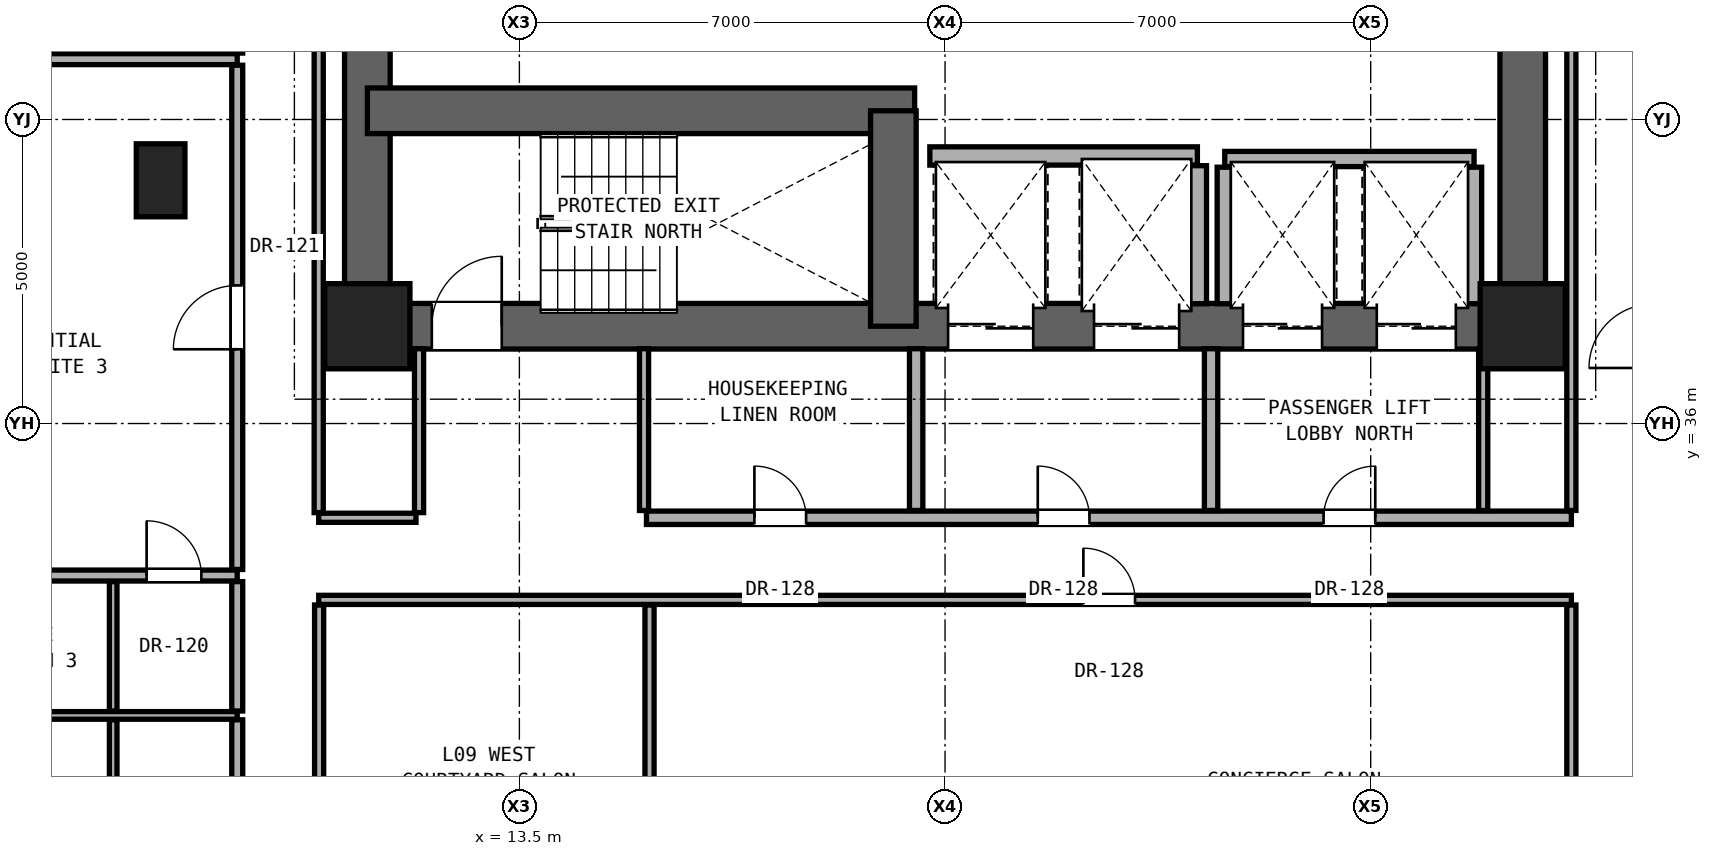
"""IFC4 building model, lengths in metres.
Left out: names, types, materials, properties, quantities, classifications, styles, units other than length and angle.
Written with IfcOpenShell. Run it as: python <this file> out.ifc"""

import sys

from ifc_helpers import new_model, si_unit, direction, frame, frame_2d, origin, origin_2d, place, context, subcontext, project, spatial, rectangle, extrude, element, fill, save


model = new_model("IFC4")
c1 = context("Model", 3, precision=1e-05, world=origin(), true_north=direction((0.0, 1.0)))
c2 = subcontext(c1, "Body", "Model", "MODEL_VIEW")
j1 = project(units=[si_unit("LENGTHUNIT", "METRE"), si_unit("PLANEANGLEUNIT", "RADIAN")], contexts=[c1])
p1 = place(None, origin())
s1 = spatial("IfcSite", under=j1, at=p1, CompositionType="ELEMENT")
p2 = place(p1, origin())
s2 = spatial("IfcBuilding", under=s1, at=p2, CompositionType="ELEMENT")
p3 = place(p2, frame((0.0, 0.0, 35.6)))
s3 = spatial("IfcBuildingStorey", under=s2, at=p3, CompositionType="ELEMENT", Elevation=35.6)
for number, where, z_axis, x_axis in (
    (1, (11.0, 37.6, 0.0), (0.0, 0.0, 1.0), (1.0, 0.0, 0.0)),
    (2, (30.0, 37.6, 0.0), (0.0, 0.0, 1.0), (1.0, 0.0, 0.0)),
):
    element("IfcColumn", number, at=place(p3, frame(where, z_axis=z_axis, x_axis=x_axis)), inside=s3, PredefinedType="COLUMN", context=c2, shape_type="SweptSolid", body=[
        extrude(rectangle(XDim=1.4, YDim=1.4, at=origin_2d()), origin(), (0.0, 0.0, 1.0), 3.3),
    ])
p4 = place(p3, frame((7.6, 40.0, 0.0), z_axis=(0.0, 0.0, 1.0), x_axis=(1.0, 0.0, 0.0)))
e3 = element("IfcColumn", 3, at=p4, inside=s3, PredefinedType="PILASTER", context=c2, shape_type="SweptSolid", body=[
    extrude(rectangle(XDim=0.8, YDim=1.2, at=origin_2d()), origin(), (0.0, 0.0, 1.0), 3.3),
])
for number, where, z_axis, x_axis in (
    (4, (11.0, 37.6, 0.0), (0.0, 0.0, 1.0), (0.0, 1.0, 0.0)),
    (5, (30.0, 37.6, 0.0), (0.0, 0.0, 1.0), (0.0, 1.0, 0.0)),
):
    element("IfcWall", number, at=place(p3, frame(where, z_axis=z_axis, x_axis=x_axis)), inside=s3, PredefinedType="SHEAR", context=c2, shape_type="SweptSolid", body=[
        extrude(rectangle(XDim=6.0, YDim=0.75, at=frame_2d((3.0, 0.0))), origin(), (0.0, 0.0, 1.0), 3.06),
    ])
p5 = place(p3, frame((11.0, 37.6, 0.0), z_axis=(0.0, 0.0, 1.0), x_axis=(1.0, 0.0, 0.0)))
e6 = element("IfcWall", 6, at=p5, inside=s3, PredefinedType="SHEAR", context=c2, shape_type="SweptSolid", body=[
    extrude(rectangle(XDim=19.0, YDim=0.75, at=frame_2d((9.5, 0.0))), origin(), (0.0, 0.0, 1.0), 3.06),
])
p6 = place(p5, frame((1.06, 0.0, 0.0)))
e7 = element("IfcOpeningElement", 7, at=p6, cuts=e6, PredefinedType="OPENING", context=c2, shape_type="SweptSolid", body=[
    extrude(rectangle(XDim=1.15, YDim=2.2, at=frame_2d((0.575, 1.1))), frame((0.0, 0.385, 0.0), z_axis=(0.0, -1.0, 0.0), x_axis=(1.0, 0.0, 0.0)), (0.0, 0.0, 1.0), 0.77),
])
p7 = place(p5, frame((9.55, 0.0, 0.0)))
e8 = element("IfcOpeningElement", 8, at=p7, cuts=e6, PredefinedType="OPENING", context=c2, shape_type="SweptSolid", body=[
    extrude(rectangle(XDim=1.4, YDim=2.35, at=frame_2d((0.7, 1.175))), frame((0.0, 0.385, 0.0), z_axis=(0.0, -1.0, 0.0), x_axis=(1.0, 0.0, 0.0)), (0.0, 0.0, 1.0), 0.77),
])
p8 = place(p5, frame((11.95, 0.0, 0.0)))
e9 = element("IfcOpeningElement", 9, at=p8, cuts=e6, PredefinedType="OPENING", context=c2, shape_type="SweptSolid", body=[
    extrude(rectangle(XDim=1.4, YDim=2.35, at=frame_2d((0.7, 1.175))), frame((0.0, 0.385, 0.0), z_axis=(0.0, -1.0, 0.0), x_axis=(1.0, 0.0, 0.0)), (0.0, 0.0, 1.0), 0.77),
])
p9 = place(p5, frame((14.4, 0.0, 0.0)))
e10 = element("IfcOpeningElement", 10, at=p9, cuts=e6, PredefinedType="OPENING", context=c2, shape_type="SweptSolid", body=[
    extrude(rectangle(XDim=1.3, YDim=2.3, at=frame_2d((0.65, 1.15))), frame((0.0, 0.385, 0.0), z_axis=(0.0, -1.0, 0.0), x_axis=(1.0, 0.0, 0.0)), (0.0, 0.0, 1.0), 0.77),
])
p10 = place(p5, frame((16.6, 0.0, 0.0)))
e11 = element("IfcOpeningElement", 11, at=p10, cuts=e6, PredefinedType="OPENING", context=c2, shape_type="SweptSolid", body=[
    extrude(rectangle(XDim=1.3, YDim=2.3, at=frame_2d((0.65, 1.15))), frame((0.0, 0.385, 0.0), z_axis=(0.0, -1.0, 0.0), x_axis=(1.0, 0.0, 0.0)), (0.0, 0.0, 1.0), 0.77),
])
p11 = place(p3, frame((11.0, 41.143, 0.0), z_axis=(0.0, 0.0, 1.0), x_axis=(1.0, 0.0, 0.0)))
e12 = element("IfcWall", 12, at=p11, inside=s3, PredefinedType="SHEAR", context=c2, shape_type="SweptSolid", body=[
    extrude(rectangle(XDim=9.0, YDim=0.75, at=frame_2d((4.5, 0.0))), origin(), (0.0, 0.0, 1.0), 3.06),
])
p12 = place(p3, frame((19.65, 37.6, 0.0), z_axis=(0.0, 0.0, 1.0), x_axis=(0.0, 1.0, 0.0)))
e13 = element("IfcWall", 13, at=p12, inside=s3, PredefinedType="SHEAR", context=c2, shape_type="SweptSolid", body=[
    extrude(rectangle(XDim=3.543, YDim=0.75, at=frame_2d((1.771, 0.0))), origin(), (0.0, 0.0, 1.0), 3.06),
])
p13 = place(p3, frame((-1.6, 31.2, 0.0), z_axis=(0.0, 0.0, 1.0), x_axis=(1.0, 0.0, 0.0)))
e14 = element("IfcWall", 14, at=p13, inside=s3, PredefinedType="PARTITIONING", context=c2, shape_type="SweptSolid", body=[
    extrude(rectangle(XDim=10.46, YDim=0.125, at=frame_2d((5.23, 0.0))), origin(), (0.0, 0.0, 1.0), 2.125),
])
p14 = place(p3, frame((10.2, 33.1, 0.0), z_axis=(0.0, 0.0, 1.0), x_axis=(1.0, 0.0, 0.0)))
e15 = element("IfcWall", 15, at=p14, inside=s3, PredefinedType="PARTITIONING", context=c2, shape_type="SweptSolid", body=[
    extrude(rectangle(XDim=20.6, YDim=0.15, at=frame_2d((10.3, 0.0))), origin(), (0.0, 0.0, 1.0), 2.104),
])
p15 = place(p14, frame((12.575, 0.0, 0.0)))
e16 = element("IfcOpeningElement", 16, at=p15, cuts=e15, PredefinedType="OPENING", context=c2, shape_type="SweptSolid", body=[
    extrude(rectangle(XDim=0.85, YDim=2.01, at=frame_2d((0.425, 1.005))), frame((0.0, 0.085, 0.0), z_axis=(0.0, -1.0, 0.0), x_axis=(1.0, 0.0, 0.0)), (0.0, 0.0, 1.0), 0.17),
])
p16 = place(p3, frame((-1.6, 33.5, 0.0), z_axis=(0.0, 0.0, 1.0), x_axis=(1.0, 0.0, 0.0)))
e17 = element("IfcWall", 17, at=p16, inside=s3, PredefinedType="PARTITIONING", context=c2, shape_type="SweptSolid", body=[
    extrude(rectangle(XDim=10.46, YDim=0.18, at=frame_2d((5.23, 0.0))), origin(), (0.0, 0.0, 1.0), 2.125),
])
p17 = place(p16, frame((3.805, 0.0, 0.0)))
e18 = element("IfcOpeningElement", 18, at=p17, cuts=e17, PredefinedType="OPENING", context=c2, shape_type="SweptSolid", body=[
    extrude(rectangle(XDim=0.85, YDim=2.01, at=frame_2d((0.425, 1.005))), frame((0.0, 0.1, 0.0), z_axis=(0.0, -1.0, 0.0), x_axis=(1.0, 0.0, 0.0)), (0.0, 0.0, 1.0), 0.2),
])
p18 = place(p16, frame((8.97, 0.0, 0.0)))
e19 = element("IfcOpeningElement", 19, at=p18, cuts=e17, PredefinedType="OPENING", context=c2, shape_type="SweptSolid", body=[
    extrude(rectangle(XDim=0.9, YDim=2.1, at=frame_2d((0.45, 1.05))), frame((0.0, 0.1, 0.0), z_axis=(0.0, -1.0, 0.0), x_axis=(1.0, 0.0, 0.0)), (0.0, 0.0, 1.0), 0.2),
])
p19 = place(p3, frame((10.2, 34.45, 0.0), z_axis=(0.0, 0.0, 1.0), x_axis=(1.0, 0.0, 0.0)))
e20 = element("IfcWall", 20, at=p19, inside=s3, PredefinedType="PARTITIONING", context=c2, shape_type="SweptSolid", body=[
    extrude(rectangle(XDim=1.6, YDim=0.15, at=frame_2d((0.8, 0.0))), origin(), (0.0, 0.0, 1.0), 2.104),
])
p20 = place(p3, frame((15.59, 34.45, 0.0), z_axis=(0.0, 0.0, 1.0), x_axis=(1.0, 0.0, 0.0)))
e21 = element("IfcWall", 21, at=p20, inside=s3, PredefinedType="SOLIDWALL", context=c2, shape_type="SweptSolid", body=[
    extrude(rectangle(XDim=15.21, YDim=0.22, at=frame_2d((7.605, 0.0))), origin(), (0.0, 0.0, 1.0), 2.104),
])
p21 = place(p20, frame((6.435, 0.0, 0.0)))
e22 = element("IfcOpeningElement", 22, at=p21, cuts=e21, PredefinedType="OPENING", context=c2, shape_type="SweptSolid", body=[
    extrude(rectangle(XDim=0.85, YDim=2.01, at=frame_2d((0.425, 1.005))), frame((0.0, 0.12, 0.0), z_axis=(0.0, -1.0, 0.0), x_axis=(1.0, 0.0, 0.0)), (0.0, 0.0, 1.0), 0.24),
])
p22 = place(p20, frame((11.135, 0.0, 0.0)))
e23 = element("IfcOpeningElement", 23, at=p22, cuts=e21, PredefinedType="OPENING", context=c2, shape_type="SweptSolid", body=[
    extrude(rectangle(XDim=0.85, YDim=2.01, at=frame_2d((0.425, 1.005))), frame((0.0, 0.12, 0.0), z_axis=(0.0, -1.0, 0.0), x_axis=(1.0, 0.0, 0.0)), (0.0, 0.0, 1.0), 0.24),
])
p23 = place(p20, frame((1.775, 0.0, 0.0)))
e24 = element("IfcOpeningElement", 24, at=p23, cuts=e21, PredefinedType="OPENING", context=c2, shape_type="SweptSolid", body=[
    extrude(rectangle(XDim=0.85, YDim=2.01, at=frame_2d((0.425, 1.005))), frame((0.0, 0.12, 0.0), z_axis=(0.0, -1.0, 0.0), x_axis=(1.0, 0.0, 0.0)), (0.0, 0.0, 1.0), 0.24),
])
p24 = place(p3, frame((25.1, 40.35, 0.0), z_axis=(0.0, 0.0, 1.0), x_axis=(1.0, 0.0, 0.0)))
e25 = element("IfcWall", 25, at=p24, inside=s3, PredefinedType="SOLIDWALL", context=c2, shape_type="SweptSolid", body=[
    extrude(rectangle(XDim=4.1, YDim=0.25, at=frame_2d((2.05, 0.0))), origin(), (0.0, 0.0, 1.0), 3.06),
])
p25 = place(p3, frame((20.25, 40.4, 0.0), z_axis=(0.0, 0.0, 1.0), x_axis=(1.0, 0.0, 0.0)))
e26 = element("IfcWall", 26, at=p25, inside=s3, PredefinedType="SOLIDWALL", context=c2, shape_type="SweptSolid", body=[
    extrude(rectangle(XDim=4.4, YDim=0.3, at=frame_2d((2.2, 0.0))), origin(), (0.0, 0.0, 1.0), 3.06),
])
p26 = place(p3, frame((3.8, 41.992, 0.0), z_axis=(0.0, 0.0, 1.0), x_axis=(1.0, 0.0, 0.0)))
e27 = element("IfcWall", 27, at=p26, inside=s3, PredefinedType="PARTITIONING", context=c2, shape_type="SweptSolid", body=[
    extrude(rectangle(XDim=5.06, YDim=0.18, at=frame_2d((2.53, 0.0))), origin(), (0.0, 0.0, 1.0), 3.06),
])
for number, where, z_axis, x_axis in (
    (28, (6.82, 29.0, 0.0), (0.0, 0.0, 1.0), (0.0, 1.0, 0.0)),
    (29, (6.82, 31.272, 0.0), (0.0, 0.0, 1.0), (0.0, 1.0, 0.0)),
):
    element("IfcWall", number, at=place(p3, frame(where, z_axis=z_axis, x_axis=x_axis)), inside=s3, PredefinedType="PARTITIONING", context=c2, shape_type="SweptSolid", body=[
        extrude(rectangle(XDim=2.127, YDim=0.125, at=frame_2d((1.064, 0.0))), origin(), (0.0, 0.0, 1.0), 2.279),
    ])
for number, where, z_axis, x_axis in (
    (30, (8.86, 29.0, 0.0), (0.0, 0.0, 1.0), (0.0, 1.0, 0.0)),
    (31, (8.86, 31.272, 0.0), (0.0, 0.0, 1.0), (0.0, 1.0, 0.0)),
):
    element("IfcWall", number, at=place(p3, frame(where, z_axis=z_axis, x_axis=x_axis)), inside=s3, PredefinedType="PARTITIONING", context=c2, shape_type="SweptSolid", body=[
        extrude(rectangle(XDim=2.127, YDim=0.18, at=frame_2d((1.064, 0.0))), origin(), (0.0, 0.0, 1.0), 2.279),
    ])
p27 = place(p3, frame((8.86, 33.6, 0.0), z_axis=(0.0, 0.0, 1.0), x_axis=(0.0, 1.0, 0.0)))
e32 = element("IfcWall", 32, at=p27, inside=s3, PredefinedType="PARTITIONING", context=c2, shape_type="SweptSolid", body=[
    extrude(rectangle(XDim=8.292, YDim=0.18, at=frame_2d((4.146, 0.0))), origin(), (0.0, 0.0, 1.0), 2.436),
])
p28 = place(p27, frame((3.621, 0.0, 0.0)))
e33 = element("IfcOpeningElement", 33, at=p28, cuts=e32, PredefinedType="OPENING", context=c2, shape_type="SweptSolid", body=[
    extrude(rectangle(XDim=1.05, YDim=2.2, at=frame_2d((0.525, 1.1))), frame((0.0, 0.1, 0.0), z_axis=(0.0, -1.0, 0.0), x_axis=(1.0, 0.0, 0.0)), (0.0, 0.0, 1.0), 0.2),
])
p29 = place(p3, frame((8.86, 42.092, 0.0), z_axis=(0.0, 0.0, 1.0), x_axis=(0.0, 1.0, 0.0)))
e34 = element("IfcWall", 34, at=p29, inside=s3, PredefinedType="PARTITIONING", context=c2, shape_type="SweptSolid", body=[
    extrude(rectangle(XDim=5.28, YDim=0.18, at=frame_2d((2.64, 0.0))), origin(), (0.0, 0.0, 1.0), 3.06),
])
p30 = place(p29, frame((2.165, 0.0, 0.0)))
e35 = element("IfcOpeningElement", 35, at=p30, cuts=e34, PredefinedType="OPENING", context=c2, shape_type="SweptSolid", body=[
    extrude(rectangle(XDim=0.95, YDim=2.15, at=frame_2d((0.475, 1.075))), frame((0.0, 0.1, 0.0), z_axis=(0.0, -1.0, 0.0), x_axis=(1.0, 0.0, 0.0)), (0.0, 0.0, 1.0), 0.2),
])
p31 = place(p3, frame((10.207, 22.935, 0.0), z_axis=(0.0, 0.0, 1.0), x_axis=(0.0, 1.0, 0.0)))
e36 = element("IfcWall", 36, at=p31, inside=s3, PredefinedType="PARTITIONING", context=c2, shape_type="SweptSolid", body=[
    extrude(rectangle(XDim=10.08, YDim=0.15, at=frame_2d((5.04, 0.0))), origin(), (0.0, 0.0, 1.0), 2.279),
])
p32 = place(p31, frame((4.565, 0.0, 0.0)))
e37 = element("IfcOpeningElement", 37, at=p32, cuts=e36, PredefinedType="OPENING", context=c2, shape_type="SweptSolid", body=[
    extrude(rectangle(XDim=0.95, YDim=2.15, at=frame_2d((0.475, 1.075))), frame((0.0, 0.085, 0.0), z_axis=(0.0, -1.0, 0.0), x_axis=(1.0, 0.0, 0.0)), (0.0, 0.0, 1.0), 0.17),
])
p33 = place(p3, frame((10.2, 34.535, 0.0), z_axis=(0.0, 0.0, 1.0), x_axis=(0.0, 1.0, 0.0)))
e38 = element("IfcWall", 38, at=p33, inside=s3, PredefinedType="PARTITIONING", context=c2, shape_type="SweptSolid", body=[
    extrude(rectangle(XDim=9.13, YDim=0.15, at=frame_2d((4.565, 0.0))), origin(), (0.0, 0.0, 1.0), 2.436),
])
p34 = place(p3, frame((11.85, 34.535, 0.0), z_axis=(0.0, 0.0, 1.0), x_axis=(0.0, 1.0, 0.0)))
e39 = element("IfcWall", 39, at=p34, inside=s3, PredefinedType="PARTITIONING", context=c2, shape_type="SweptSolid", body=[
    extrude(rectangle(XDim=2.695, YDim=0.15, at=frame_2d((1.348, 0.0))), origin(), (0.0, 0.0, 1.0), 3.06),
])
p35 = place(p3, frame((15.64, 27.113, 0.0), z_axis=(0.0, 0.0, 1.0), x_axis=(0.0, 1.0, 0.0)))
e40 = element("IfcWall", 40, at=p35, inside=s3, PredefinedType="PARTITIONING", context=c2, shape_type="SweptSolid", body=[
    extrude(rectangle(XDim=5.902, YDim=0.15, at=frame_2d((2.951, 0.0))), origin(), (0.0, 0.0, 1.0), 2.104),
])
p36 = place(p3, frame((15.55, 34.57, 0.0), z_axis=(0.0, 0.0, 1.0), x_axis=(0.0, 1.0, 0.0)))
e41 = element("IfcWall", 41, at=p36, inside=s3, PredefinedType="PARTITIONING", context=c2, shape_type="SweptSolid", body=[
    extrude(rectangle(XDim=2.66, YDim=0.15, at=frame_2d((1.33, 0.0))), origin(), (0.0, 0.0, 1.0), 2.589),
])
p37 = place(p3, frame((20.025, 34.57, 0.0), z_axis=(0.0, 0.0, 1.0), x_axis=(0.0, 1.0, 0.0)))
e42 = element("IfcWall", 42, at=p37, inside=s3, PredefinedType="SOLIDWALL", context=c2, shape_type="SweptSolid", body=[
    extrude(rectangle(XDim=2.66, YDim=0.22, at=frame_2d((1.33, 0.0))), origin(), (0.0, 0.0, 1.0), 3.06),
])
p38 = place(p3, frame((24.65, 37.97, 0.0), z_axis=(0.0, 0.0, 1.0), x_axis=(0.0, 1.0, 0.0)))
e43 = element("IfcWall", 43, at=p38, inside=s3, PredefinedType="SOLIDWALL", context=c2, shape_type="SweptSolid", body=[
    extrude(rectangle(XDim=2.27, YDim=0.3, at=frame_2d((1.135, 0.0))), origin(), (0.0, 0.0, 1.0), 3.06),
])
p39 = place(p3, frame((24.875, 34.57, 0.0), z_axis=(0.0, 0.0, 1.0), x_axis=(0.0, 1.0, 0.0)))
e44 = element("IfcWall", 44, at=p39, inside=s3, PredefinedType="SOLIDWALL", context=c2, shape_type="SweptSolid", body=[
    extrude(rectangle(XDim=2.66, YDim=0.22, at=frame_2d((1.33, 0.0))), origin(), (0.0, 0.0, 1.0), 3.06),
])
p40 = place(p3, frame((25.1, 37.97, 0.0), z_axis=(0.0, 0.0, 1.0), x_axis=(0.0, 1.0, 0.0)))
e45 = element("IfcWall", 45, at=p40, inside=s3, PredefinedType="SOLIDWALL", context=c2, shape_type="SweptSolid", body=[
    extrude(rectangle(XDim=2.245, YDim=0.25, at=frame_2d((1.123, 0.0))), origin(), (0.0, 0.0, 1.0), 3.06),
])
p41 = place(p3, frame((29.35, 34.57, 0.0), z_axis=(0.0, 0.0, 1.0), x_axis=(0.0, 1.0, 0.0)))
e46 = element("IfcWall", 46, at=p41, inside=s3, PredefinedType="PARTITIONING", context=c2, shape_type="SweptSolid", body=[
    extrude(rectangle(XDim=2.66, YDim=0.15, at=frame_2d((1.33, 0.0))), origin(), (0.0, 0.0, 1.0), 3.06),
])
p42 = place(p3, frame((29.2, 37.97, 0.0), z_axis=(0.0, 0.0, 1.0), x_axis=(0.0, 1.0, 0.0)))
e47 = element("IfcWall", 47, at=p42, inside=s3, PredefinedType="SOLIDWALL", context=c2, shape_type="SweptSolid", body=[
    extrude(rectangle(XDim=2.245, YDim=0.25, at=frame_2d((1.123, 0.0))), origin(), (0.0, 0.0, 1.0), 3.06),
])
p43 = place(p3, frame((30.8, 27.113, 0.0), z_axis=(0.0, 0.0, 1.0), x_axis=(0.0, 1.0, 0.0)))
e48 = element("IfcWall", 48, at=p43, inside=s3, PredefinedType="PARTITIONING", context=c2, shape_type="SweptSolid", body=[
    extrude(rectangle(XDim=5.902, YDim=0.15, at=frame_2d((2.951, 0.0))), origin(), (0.0, 0.0, 1.0), 2.279),
])
p44 = place(p3, frame((30.8, 34.57, 0.0), z_axis=(0.0, 0.0, 1.0), x_axis=(0.0, 1.0, 0.0)))
e49 = element("IfcWall", 49, at=p44, inside=s3, PredefinedType="PARTITIONING", context=c2, shape_type="SweptSolid", body=[
    extrude(rectangle(XDim=9.095, YDim=0.15, at=frame_2d((4.547, 0.0))), origin(), (0.0, 0.0, 1.0), 2.436),
])
p45 = place(p6, origin())
e50 = element("IfcDoor", 50, at=p45, inside=s3, OperationType="SINGLE_SWING_RIGHT", PredefinedType="DOOR", context=c2, shape_type="SweptSolid", body=[
    extrude(rectangle(XDim=1.15, YDim=2.2, at=frame_2d((0.575, 1.1))), frame((0.0, 0.025, 0.0), z_axis=(0.0, -1.0, 0.0), x_axis=(1.0, 0.0, 0.0)), (0.0, 0.0, 1.0), 0.05),
])
fill(e7, e50)
p46 = place(p21, origin())
e51 = element("IfcDoor", 51, at=p46, inside=s3, OperationType="SINGLE_SWING_LEFT", PredefinedType="DOOR", context=c2, shape_type="SweptSolid", body=[
    extrude(rectangle(XDim=0.85, YDim=2.01, at=frame_2d((0.425, 1.005))), frame((0.0, 0.025, 0.0), z_axis=(0.0, -1.0, 0.0), x_axis=(1.0, 0.0, 0.0)), (0.0, 0.0, 1.0), 0.05),
])
fill(e22, e51)
p47 = place(p22, origin())
e52 = element("IfcDoor", 52, at=p47, inside=s3, OperationType="SINGLE_SWING_RIGHT", PredefinedType="DOOR", context=c2, shape_type="SweptSolid", body=[
    extrude(rectangle(XDim=0.85, YDim=2.01, at=frame_2d((0.425, 1.005))), frame((0.0, 0.025, 0.0), z_axis=(0.0, -1.0, 0.0), x_axis=(1.0, 0.0, 0.0)), (0.0, 0.0, 1.0), 0.05),
])
fill(e23, e52)
p48 = place(p23, origin())
e53 = element("IfcDoor", 53, at=p48, inside=s3, OperationType="SINGLE_SWING_LEFT", PredefinedType="DOOR", context=c2, shape_type="SweptSolid", body=[
    extrude(rectangle(XDim=0.85, YDim=2.01, at=frame_2d((0.425, 1.005))), frame((0.0, 0.025, 0.0), z_axis=(0.0, -1.0, 0.0), x_axis=(1.0, 0.0, 0.0)), (0.0, 0.0, 1.0), 0.05),
])
fill(e24, e53)
p49 = place(p28, origin())
e54 = element("IfcDoor", 54, at=p49, inside=s3, OperationType="SINGLE_SWING_LEFT", PredefinedType="DOOR", context=c2, shape_type="SweptSolid", body=[
    extrude(rectangle(XDim=1.05, YDim=2.2, at=frame_2d((0.525, 1.1))), frame((0.0, 0.025, 0.0), z_axis=(0.0, -1.0, 0.0), x_axis=(1.0, 0.0, 0.0)), (0.0, 0.0, 1.0), 0.05),
])
fill(e33, e54)
p50 = place(p18, origin())
e55 = element("IfcDoor", 55, at=p50, inside=s3, OperationType="SINGLE_SWING_LEFT", PredefinedType="DOOR", context=c2, shape_type="SweptSolid", body=[
    extrude(rectangle(XDim=0.9, YDim=2.1, at=frame_2d((0.45, 1.05))), frame((0.0, 0.025, 0.0), z_axis=(0.0, -1.0, 0.0), x_axis=(1.0, 0.0, 0.0)), (0.0, 0.0, 1.0), 0.05),
])
fill(e19, e55)
p51 = place(p15, origin())
e56 = element("IfcDoor", 56, at=p51, inside=s3, OperationType="SINGLE_SWING_LEFT", PredefinedType="DOOR", context=c2, shape_type="SweptSolid", body=[
    extrude(rectangle(XDim=0.85, YDim=2.01, at=frame_2d((0.425, 1.005))), frame((0.0, 0.025, 0.0), z_axis=(0.0, -1.0, 0.0), x_axis=(1.0, 0.0, 0.0)), (0.0, 0.0, 1.0), 0.05),
])
fill(e16, e56)
p52 = place(p7, origin())
e57 = element("IfcDoor", 57, at=p52, inside=s3, OperationType="DOUBLE_DOOR_SLIDING", PredefinedType="DOOR", context=c2, shape_type="SweptSolid", body=[
    extrude(rectangle(XDim=1.4, YDim=2.35, at=frame_2d((0.7, 1.175))), frame((0.0, 0.025, 0.0), z_axis=(0.0, -1.0, 0.0), x_axis=(1.0, 0.0, 0.0)), (0.0, 0.0, 1.0), 0.05),
])
fill(e8, e57)
p53 = place(p8, origin())
e58 = element("IfcDoor", 58, at=p53, inside=s3, OperationType="DOUBLE_DOOR_SLIDING", PredefinedType="DOOR", context=c2, shape_type="SweptSolid", body=[
    extrude(rectangle(XDim=1.4, YDim=2.35, at=frame_2d((0.7, 1.175))), frame((0.0, 0.025, 0.0), z_axis=(0.0, -1.0, 0.0), x_axis=(1.0, 0.0, 0.0)), (0.0, 0.0, 1.0), 0.05),
])
fill(e9, e58)
p54 = place(p9, origin())
e59 = element("IfcDoor", 59, at=p54, inside=s3, OperationType="DOUBLE_DOOR_SLIDING", PredefinedType="DOOR", context=c2, shape_type="SweptSolid", body=[
    extrude(rectangle(XDim=1.3, YDim=2.3, at=frame_2d((0.65, 1.15))), frame((0.0, 0.025, 0.0), z_axis=(0.0, -1.0, 0.0), x_axis=(1.0, 0.0, 0.0)), (0.0, 0.0, 1.0), 0.05),
])
fill(e10, e59)
p55 = place(p10, origin())
e60 = element("IfcDoor", 60, at=p55, inside=s3, OperationType="DOUBLE_DOOR_SLIDING", PredefinedType="DOOR", context=c2, shape_type="SweptSolid", body=[
    extrude(rectangle(XDim=1.3, YDim=2.3, at=frame_2d((0.65, 1.15))), frame((0.0, 0.025, 0.0), z_axis=(0.0, -1.0, 0.0), x_axis=(1.0, 0.0, 0.0)), (0.0, 0.0, 1.0), 0.05),
])
fill(e11, e60)
save(model, sys.argv[1])
